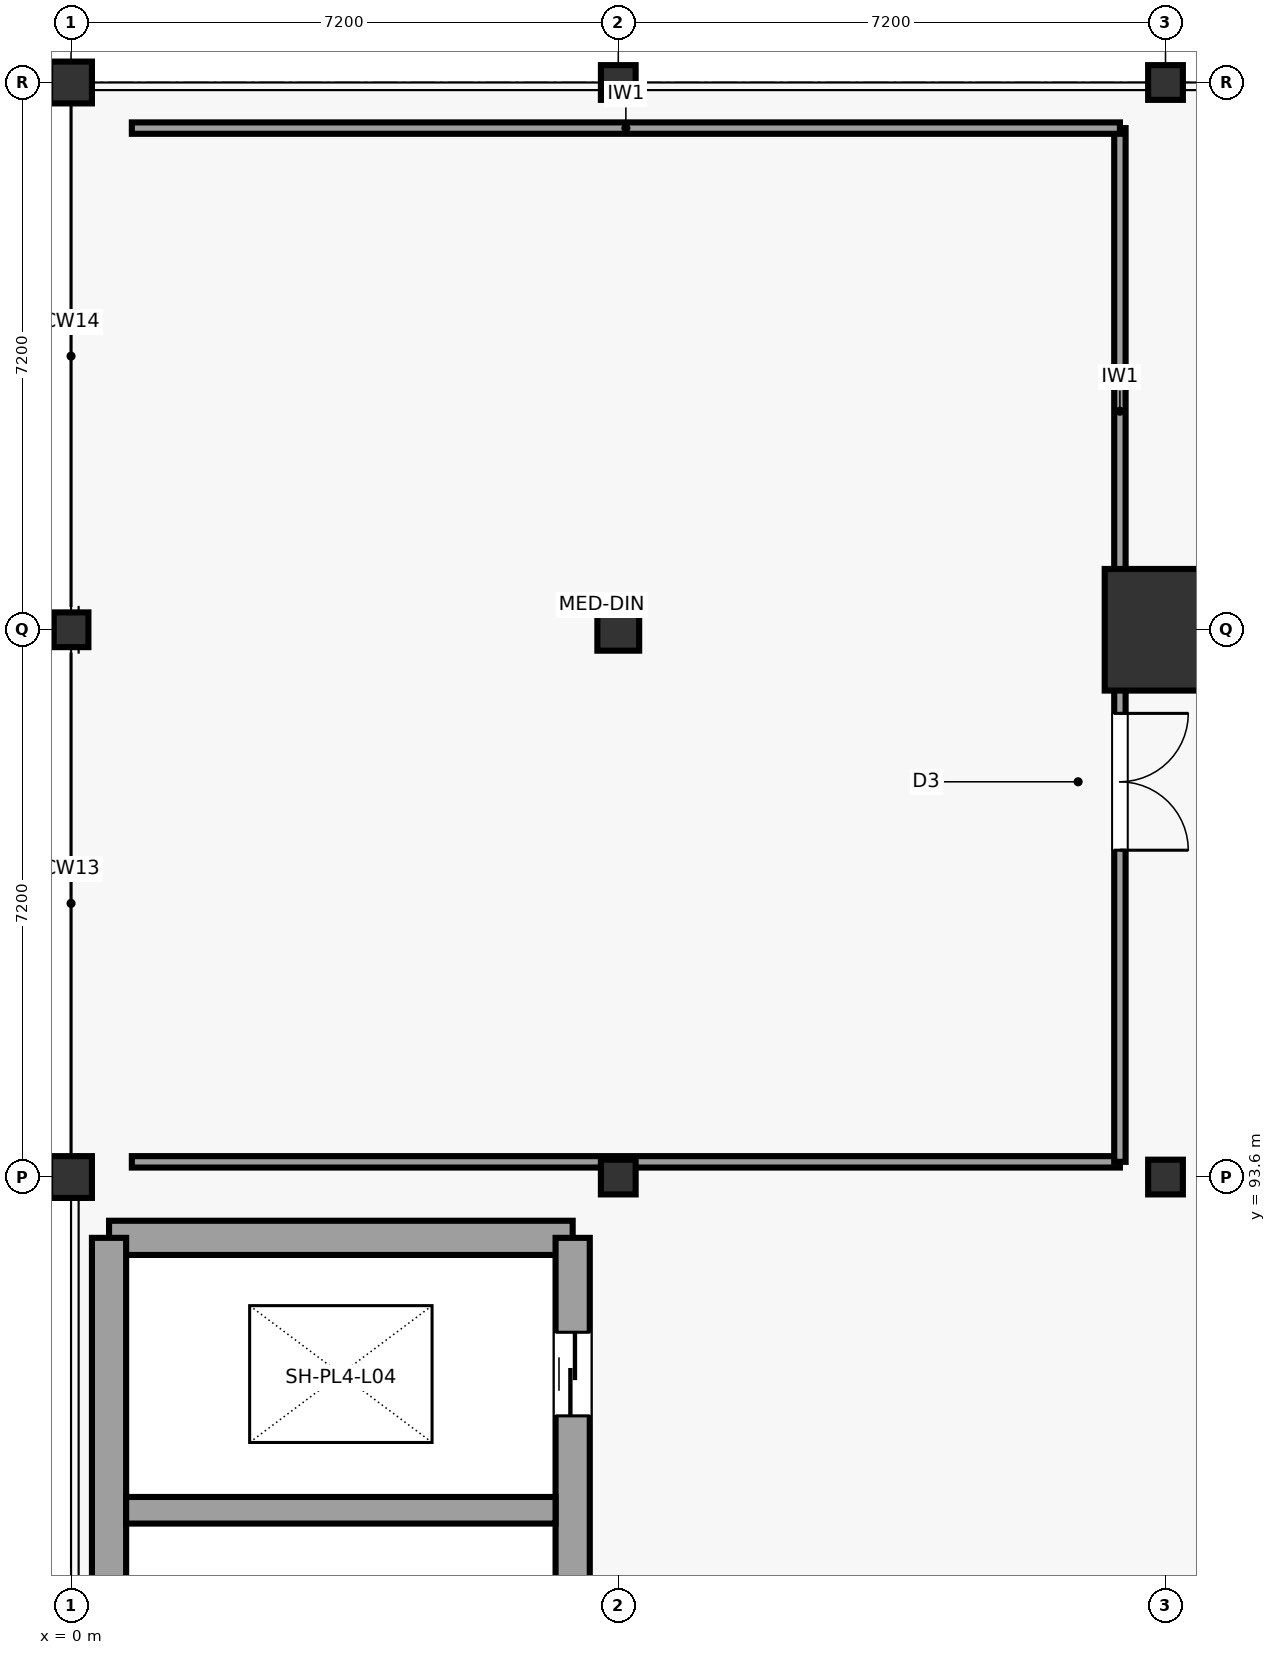
"""IFC4 building model, lengths in metres.
Left out: names, types, materials, properties, quantities, classifications, styles, units other than length and angle.
Written with IfcOpenShell. Run it as: python <this file> out.ifc"""

import sys

from ifc_helpers import new_model, si_unit, direction, frame, frame_2d, origin, origin_2d, place, context, subcontext, project, spatial, rectangle, circle, hollow_circle, extrude, element, fill, save


model = new_model("IFC4")
c1 = context("Model", 3, precision=1e-05, world=origin(), true_north=direction((0.0, 1.0)))
c2 = subcontext(c1, "Body", "Model", "MODEL_VIEW")
j1 = project(units=[si_unit("LENGTHUNIT", "METRE"), si_unit("PLANEANGLEUNIT", "RADIAN")], contexts=[c1])
p1 = place(None, origin())
s1 = spatial("IfcSite", under=j1, at=p1, CompositionType="ELEMENT")
p2 = place(p1, origin())
s2 = spatial("IfcBuilding", under=s1, at=p2, CompositionType="ELEMENT")
p3 = place(p2, frame((0.0, 0.0, 18.6)))
s3 = spatial("IfcBuildingStorey", under=s2, at=p3, CompositionType="ELEMENT", Elevation=18.6)
p4 = place(p3, frame((0.0, 93.6, 0.0), z_axis=(0.0, 0.0, 1.0), x_axis=(1.0, 0.0, 0.0)))
e1 = element("IfcColumn", 1, at=p4, inside=s3, PredefinedType="COLUMN", context=c2, shape_type="SweptSolid", body=[
    extrude(rectangle(XDim=0.55, YDim=0.55, at=origin_2d()), origin(), (0.0, 0.0, 1.0), 4.4),
])
p5 = place(p3, frame((0.0, 100.8, 0.0), z_axis=(0.0, 0.0, 1.0), x_axis=(1.0, 0.0, 0.0)))
e2 = element("IfcColumn", 2, at=p5, inside=s3, PredefinedType="COLUMN", context=c2, shape_type="SweptSolid", body=[
    extrude(hollow_circle(Radius=0.229, WallThickness=0.02, at=origin_2d()), origin(), (0.0, 0.0, 1.0), 4.4),
])
p6 = place(p3, frame((0.0, 108.0, 0.0), z_axis=(0.0, 0.0, 1.0), x_axis=(1.0, 0.0, 0.0)))
e3 = element("IfcColumn", 3, at=p6, inside=s3, PredefinedType="COLUMN", context=c2, shape_type="SweptSolid", body=[
    extrude(rectangle(XDim=0.55, YDim=0.55, at=origin_2d()), origin(), (0.0, 0.0, 1.0), 4.4),
])
p7 = place(p3, frame((7.2, 93.6, 0.0), z_axis=(0.0, 0.0, 1.0), x_axis=(1.0, 0.0, 0.0)))
e4 = element("IfcColumn", 4, at=p7, inside=s3, PredefinedType="COLUMN", context=c2, shape_type="SweptSolid", body=[
    extrude(hollow_circle(Radius=0.229, WallThickness=0.02, at=origin_2d()), origin(), (0.0, 0.0, 1.0), 4.4),
])
p8 = place(p3, frame((7.2, 100.8, 0.0), z_axis=(0.0, 0.0, 1.0), x_axis=(1.0, 0.0, 0.0)))
e5 = element("IfcColumn", 5, at=p8, inside=s3, PredefinedType="COLUMN", context=c2, shape_type="SweptSolid", body=[
    extrude(rectangle(XDim=0.55, YDim=0.55, at=origin_2d()), origin(), (0.0, 0.0, 1.0), 4.4),
])
for number, where, z_axis, x_axis in (
    (6, (7.2, 108.0, 0.0), (0.0, 0.0, 1.0), (1.0, 0.0, 0.0)),
    (7, (14.4, 93.6, 0.0), (0.0, 0.0, 1.0), (1.0, 0.0, 0.0)),
):
    element("IfcColumn", number, at=place(p3, frame(where, z_axis=z_axis, x_axis=x_axis)), inside=s3, PredefinedType="COLUMN", context=c2, shape_type="SweptSolid", body=[
        extrude(hollow_circle(Radius=0.229, WallThickness=0.02, at=origin_2d()), origin(), (0.0, 0.0, 1.0), 4.4),
    ])
p9 = place(p3, frame((14.4, 100.8, 0.0), z_axis=(0.0, 0.0, 1.0), x_axis=(1.0, 0.0, 0.0)))
e8 = element("IfcColumn", 8, at=p9, inside=s3, PredefinedType="COLUMN", context=c2, shape_type="SweptSolid", body=[
    extrude(circle(Radius=0.8, at=origin_2d()), origin(), (0.0, 0.0, 1.0), 4.4),
])
p10 = place(p3, frame((14.4, 108.0, 0.0), z_axis=(0.0, 0.0, 1.0), x_axis=(1.0, 0.0, 0.0)))
e9 = element("IfcColumn", 9, at=p10, inside=s3, PredefinedType="COLUMN", context=c2, shape_type="SweptSolid", body=[
    extrude(hollow_circle(Radius=0.229, WallThickness=0.02, at=origin_2d()), origin(), (0.0, 0.0, 1.0), 4.4),
])
p11 = place(p3, frame((0.5, 92.8, 0.0), z_axis=(0.0, 0.0, 1.0), x_axis=(1.0, 0.0, 0.0)))
e10 = element("IfcWall", 10, at=p11, inside=s3, PredefinedType="SHEAR", context=c2, shape_type="SweptSolid", body=[
    extrude(rectangle(XDim=6.1, YDim=0.45, at=frame_2d((3.05, 0.0))), origin(), (0.0, 0.0, 1.0), 4.15),
])
p12 = place(p3, frame((0.5, 80.0, 0.0), z_axis=(0.0, 0.0, 1.0), x_axis=(0.0, 1.0, 0.0)))
e11 = element("IfcWall", 11, at=p12, inside=s3, PredefinedType="SHEAR", context=c2, shape_type="SweptSolid", body=[
    extrude(rectangle(XDim=12.8, YDim=0.45, at=frame_2d((6.4, 0.0))), origin(), (0.0, 0.0, 1.0), 4.15),
])
p13 = place(p3, frame((6.6, 80.0, 0.0), z_axis=(0.0, 0.0, 1.0), x_axis=(0.0, 1.0, 0.0)))
e12 = element("IfcWall", 12, at=p13, inside=s3, PredefinedType="SHEAR", context=c2, shape_type="SweptSolid", body=[
    extrude(rectangle(XDim=12.8, YDim=0.45, at=frame_2d((6.4, 0.0))), origin(), (0.0, 0.0, 1.0), 4.15),
])
p14 = place(p13, frame((0.55, 0.0, 0.0)))
e13 = element("IfcOpeningElement", 13, at=p14, cuts=e12, PredefinedType="OPENING", context=c2, shape_type="SweptSolid", body=[
    extrude(rectangle(XDim=1.2, YDim=2.25, at=frame_2d((0.6, 1.125))), frame((0.0, 0.235, 0.0), z_axis=(0.0, -1.0, 0.0), x_axis=(1.0, 0.0, 0.0)), (0.0, 0.0, 1.0), 0.47),
])
p15 = place(p13, frame((10.458, 0.0, 0.0)))
e14 = element("IfcOpeningElement", 14, at=p15, cuts=e12, PredefinedType="OPENING", context=c2, shape_type="SweptSolid", body=[
    extrude(rectangle(XDim=1.1, YDim=2.2, at=frame_2d((0.55, 1.1))), frame((0.0, 0.235, 0.0), z_axis=(0.0, -1.0, 0.0), x_axis=(1.0, 0.0, 0.0)), (0.0, 0.0, 1.0), 0.47),
])
p16 = place(p3, frame((0.725, 89.216, 0.0), z_axis=(0.0, 0.0, 1.0), x_axis=(1.0, 0.0, 0.0)))
e15 = element("IfcWall", 15, at=p16, inside=s3, PredefinedType="SHEAR", context=c2, shape_type="SweptSolid", body=[
    extrude(rectangle(XDim=5.65, YDim=0.35, at=frame_2d((2.825, 0.0))), origin(), (0.0, 0.0, 1.0), 4.15),
])
p17 = place(p3, frame((0.8, 93.8, 0.0), z_axis=(0.0, 0.0, 1.0), x_axis=(1.0, 0.0, 0.0)))
e16 = element("IfcWall", 16, at=p17, inside=s3, PredefinedType="PARTITIONING", context=c2, shape_type="SweptSolid", body=[
    extrude(rectangle(XDim=13.0, YDim=0.15, at=frame_2d((6.5, 0.0))), origin(), (0.0, 0.0, 1.0), 3.21),
])
p18 = place(p3, frame((13.8, 93.8, 0.0), z_axis=(0.0, 0.0, 1.0), x_axis=(0.0, 1.0, 0.0)))
e17 = element("IfcWall", 17, at=p18, inside=s3, PredefinedType="PARTITIONING", context=c2, shape_type="SweptSolid", body=[
    extrude(rectangle(XDim=13.6, YDim=0.15, at=frame_2d((6.8, 0.0))), origin(), (0.0, 0.0, 1.0), 3.21),
])
p19 = place(p18, frame((4.1, 0.0, 0.0)))
e18 = element("IfcOpeningElement", 18, at=p19, cuts=e17, PredefinedType="OPENING", context=c2, shape_type="SweptSolid", body=[
    extrude(rectangle(XDim=1.8, YDim=2.3, at=frame_2d((0.9, 1.15))), frame((0.0, 0.085, 0.0), z_axis=(0.0, -1.0, 0.0), x_axis=(1.0, 0.0, 0.0)), (0.0, 0.0, 1.0), 0.17),
])
p20 = place(p3, frame((13.8, 107.4, 0.0), z_axis=(0.0, 0.0, 1.0), x_axis=(-1.0, 0.0, 0.0)))
e19 = element("IfcWall", 19, at=p20, inside=s3, PredefinedType="PARTITIONING", context=c2, shape_type="SweptSolid", body=[
    extrude(rectangle(XDim=13.0, YDim=0.15, at=frame_2d((6.5, 0.0))), origin(), (0.0, 0.0, 1.0), 3.21),
])
p21 = place(p15, origin())
e20 = element("IfcDoor", 20, at=p21, inside=s3, OperationType="SLIDING_TO_RIGHT", PredefinedType="DOOR", context=c2, shape_type="SweptSolid", body=[
    extrude(rectangle(XDim=1.1, YDim=2.2, at=frame_2d((0.55, 1.1))), frame((0.0, 0.025, 0.0), z_axis=(0.0, -1.0, 0.0), x_axis=(1.0, 0.0, 0.0)), (0.0, 0.0, 1.0), 0.05),
])
fill(e14, e20)
p22 = place(p19, frame((1.8, 0.0, 0.0), z_axis=(0.0, 0.0, 1.0), x_axis=(-1.0, 0.0, 0.0)))
e21 = element("IfcDoor", 21, at=p22, inside=s3, OperationType="DOUBLE_DOOR_SINGLE_SWING", PredefinedType="DOOR", context=c2, shape_type="SweptSolid", body=[
    extrude(rectangle(XDim=1.8, YDim=2.3, at=frame_2d((0.9, 1.15))), frame((0.0, 0.025, 0.0), z_axis=(0.0, -1.0, 0.0), x_axis=(1.0, 0.0, 0.0)), (0.0, 0.0, 1.0), 0.05),
])
fill(e18, e21)
save(model, sys.argv[1])
